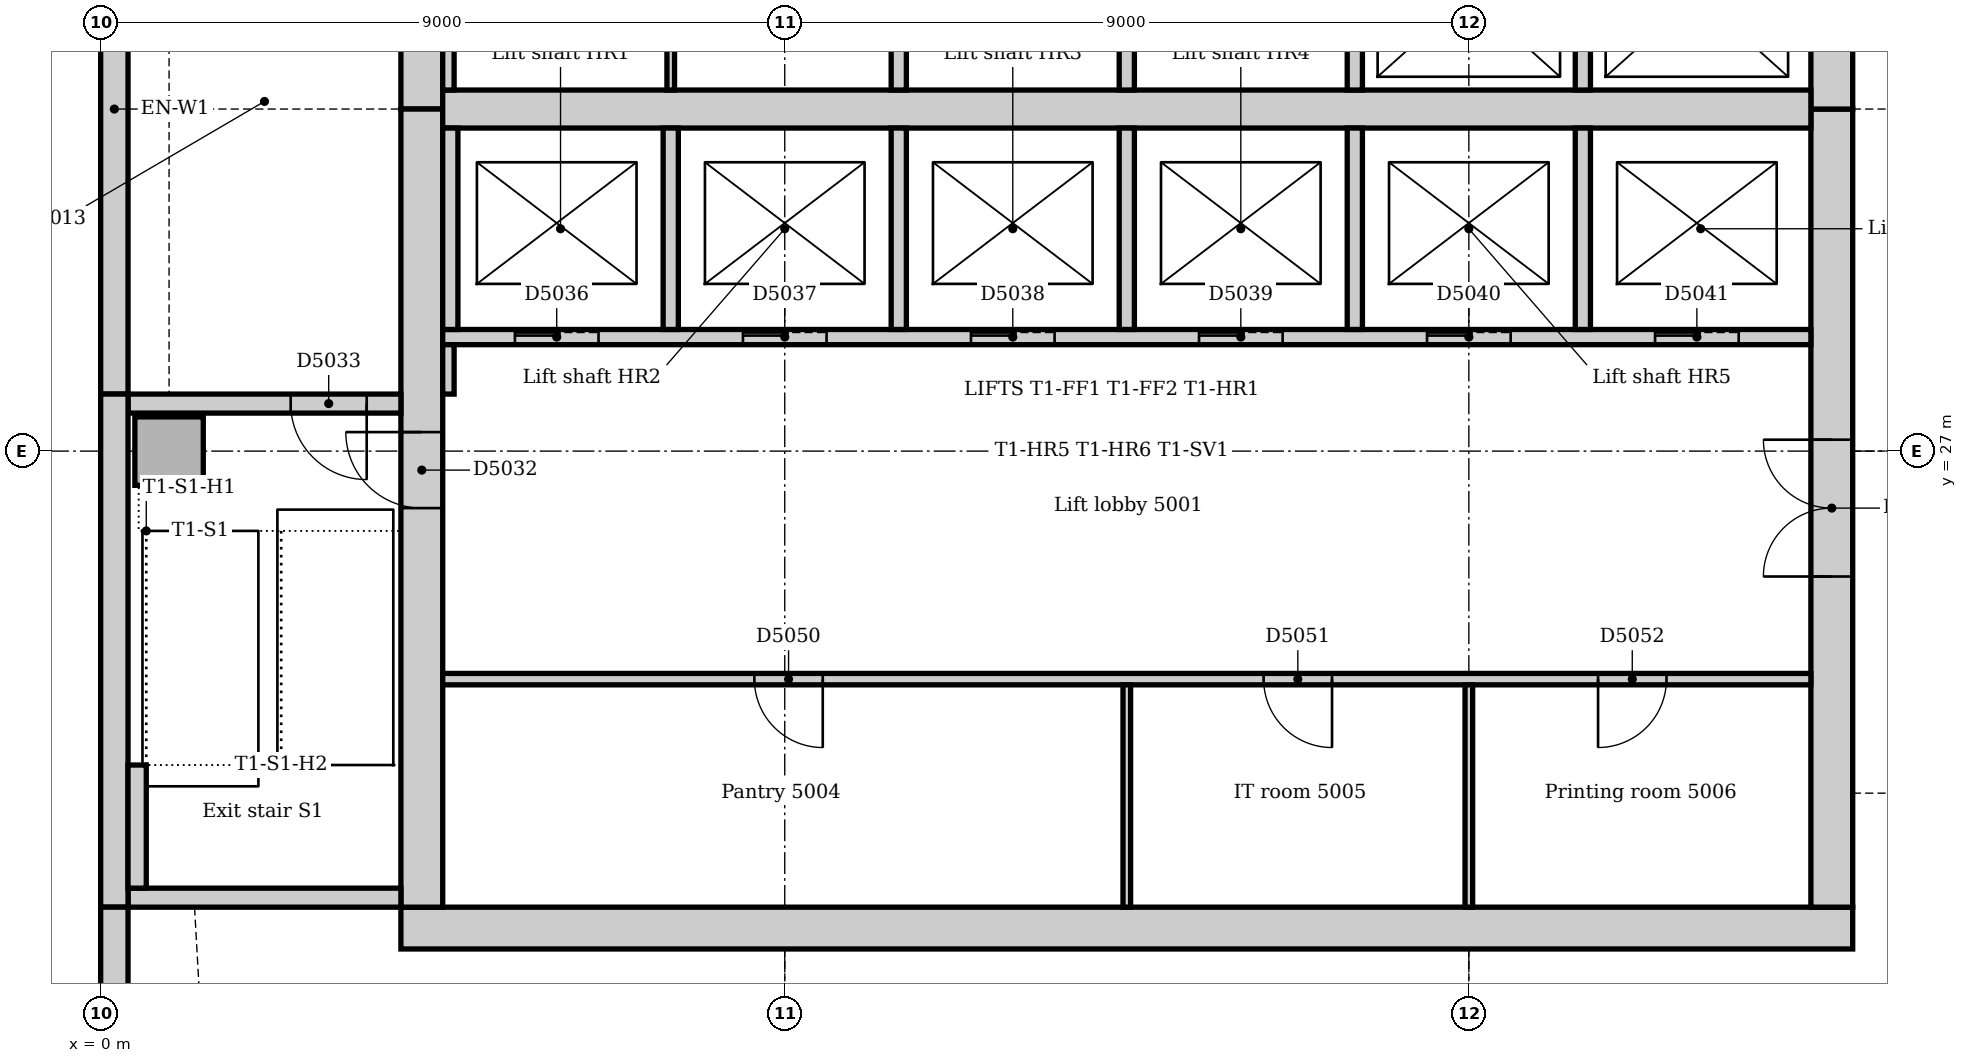
"""IFC4 building model, lengths in metres.
Left out: names, types, materials, properties, quantities, classifications, styles, units other than length and angle.
Written with IfcOpenShell. Run it as: python <this file> out.ifc"""

import sys

from ifc_helpers import new_model, si_unit, direction, frame, frame_2d, origin, origin_2d, place, context, subcontext, project, spatial, rectangle, extrude, element, fill, save


model = new_model("IFC4")
c1 = context("Model", 3, precision=1e-05, world=origin(), true_north=direction((0.0, 1.0)))
c2 = subcontext(c1, "Body", "Model", "MODEL_VIEW")
j1 = project(units=[si_unit("LENGTHUNIT", "METRE"), si_unit("PLANEANGLEUNIT", "RADIAN")], contexts=[c1])
p1 = place(None, origin())
s1 = spatial("IfcSite", under=j1, at=p1, CompositionType="ELEMENT")
p2 = place(p1, origin())
s2 = spatial("IfcBuilding", under=s1, at=p2, CompositionType="ELEMENT")
p3 = place(p2, frame((0.0, 0.0, 210.0)))
s3 = spatial("IfcBuildingStorey", under=s2, at=p3, CompositionType="ELEMENT", Elevation=210.0)
p4 = place(p3, frame((3.95, 20.725, 0.0), z_axis=(0.0, 0.0, 1.0), x_axis=(1.0, 0.0, 0.0)))
e1 = element("IfcWall", 1, at=p4, inside=s3, PredefinedType="SOLIDWALL", context=c2, shape_type="SweptSolid", body=[
    extrude(rectangle(XDim=19.1, YDim=0.55, at=frame_2d((9.55, 0.0))), origin(), (0.0, 0.0, 1.0), 4.0),
])
p5 = place(p3, frame((22.775, 21.0, 0.0), z_axis=(0.0, 0.0, 1.0), x_axis=(0.0, 1.0, 0.0)))
e2 = element("IfcWall", 2, at=p5, inside=s3, PredefinedType="SOLIDWALL", context=c2, shape_type="SweptSolid", body=[
    extrude(rectangle(XDim=10.5, YDim=0.55, at=frame_2d((5.25, 0.0))), origin(), (0.0, 0.0, 1.0), 4.0),
])
p6 = place(p5, frame((4.35, 0.0, 0.0)))
e3 = element("IfcOpeningElement", 3, at=p6, cuts=e2, PredefinedType="OPENING", context=c2, shape_type="SweptSolid", body=[
    extrude(rectangle(XDim=1.8, YDim=2.1, at=frame_2d((0.9, 1.05))), frame((0.0, 0.285, 0.0), z_axis=(0.0, -1.0, 0.0), x_axis=(1.0, 0.0, 0.0)), (0.0, 0.0, 1.0), 0.57),
])
p7 = place(p3, frame((22.775, 31.5, 0.0), z_axis=(0.0, 0.0, 1.0), x_axis=(0.0, 1.0, 0.0)))
e4 = element("IfcWall", 4, at=p7, inside=s3, PredefinedType="SOLIDWALL", context=c2, shape_type="SweptSolid", body=[
    extrude(rectangle(XDim=10.5, YDim=0.55, at=frame_2d((5.25, 0.0))), origin(), (0.0, 0.0, 1.0), 4.0),
])
p8 = place(p7, frame((3.15, 0.0, 0.0)))
e5 = element("IfcOpeningElement", 5, at=p8, cuts=e4, PredefinedType="OPENING", context=c2, shape_type="SweptSolid", body=[
    extrude(rectangle(XDim=1.0, YDim=2.1, at=frame_2d((0.5, 1.05))), frame((0.0, 0.285, 0.0), z_axis=(0.0, -1.0, 0.0), x_axis=(1.0, 0.0, 0.0)), (0.0, 0.0, 1.0), 0.57),
])
p9 = place(p7, frame((5.2, 0.0, 0.0)))
e6 = element("IfcOpeningElement", 6, at=p9, cuts=e4, PredefinedType="OPENING", context=c2, shape_type="SweptSolid", body=[
    extrude(rectangle(XDim=1.0, YDim=2.1, at=frame_2d((0.5, 1.05))), frame((0.0, 0.285, 0.0), z_axis=(0.0, -1.0, 0.0), x_axis=(1.0, 0.0, 0.0)), (0.0, 0.0, 1.0), 0.57),
])
p10 = place(p3, frame((4.225, 42.0, 0.0), z_axis=(0.0, 0.0, 1.0), x_axis=(0.0, -1.0, 0.0)))
e7 = element("IfcWall", 7, at=p10, inside=s3, PredefinedType="SOLIDWALL", context=c2, shape_type="SweptSolid", body=[
    extrude(rectangle(XDim=10.5, YDim=0.55, at=frame_2d((5.25, 0.0))), origin(), (0.0, 0.0, 1.0), 4.0),
])
p11 = place(p10, frame((5.3, 0.0, 0.0)))
e8 = element("IfcOpeningElement", 8, at=p11, cuts=e7, PredefinedType="OPENING", context=c2, shape_type="SweptSolid", body=[
    extrude(rectangle(XDim=1.0, YDim=2.1, at=frame_2d((0.5, 1.05))), frame((0.0, 0.285, 0.0), z_axis=(0.0, -1.0, 0.0), x_axis=(1.0, 0.0, 0.0)), (0.0, 0.0, 1.0), 0.57),
])
p12 = place(p3, frame((4.225, 31.5, 0.0), z_axis=(0.0, 0.0, 1.0), x_axis=(0.0, -1.0, 0.0)))
e9 = element("IfcWall", 9, at=p12, inside=s3, PredefinedType="SOLIDWALL", context=c2, shape_type="SweptSolid", body=[
    extrude(rectangle(XDim=10.5, YDim=0.55, at=frame_2d((5.25, 0.0))), origin(), (0.0, 0.0, 1.0), 4.0),
])
p13 = place(p12, frame((4.25, 0.0, 0.0)))
e10 = element("IfcOpeningElement", 10, at=p13, cuts=e9, PredefinedType="OPENING", context=c2, shape_type="SweptSolid", body=[
    extrude(rectangle(XDim=1.0, YDim=2.1, at=frame_2d((0.5, 1.05))), frame((0.0, 0.285, 0.0), z_axis=(0.0, -1.0, 0.0), x_axis=(1.0, 0.0, 0.0)), (0.0, 0.0, 1.0), 0.57),
])
p14 = place(p3, frame((4.5, 31.5, 0.0), z_axis=(0.0, 0.0, 1.0), x_axis=(1.0, 0.0, 0.0)))
e11 = element("IfcWall", 11, at=p14, inside=s3, PredefinedType="SOLIDWALL", context=c2, shape_type="SweptSolid", body=[
    extrude(rectangle(XDim=18.0, YDim=0.5, at=frame_2d((9.0, 0.0))), origin(), (0.0, 0.0, 1.0), 4.0),
])
p15 = place(p3, frame((0.36, 21.125, 0.0), z_axis=(0.0, 0.0, 1.0), x_axis=(1.0, 0.0, 0.0)))
e12 = element("IfcWall", 12, at=p15, inside=s3, PredefinedType="SOLIDWALL", context=c2, shape_type="SweptSolid", body=[
    extrude(rectangle(XDim=3.59, YDim=0.25, at=frame_2d((1.795, 0.0))), origin(), (0.0, 0.0, 1.0), 4.0),
])
p16 = place(p3, frame((3.95, 27.625, 0.0), z_axis=(0.0, 0.0, 1.0), x_axis=(-1.0, 0.0, 0.0)))
e13 = element("IfcWall", 13, at=p16, inside=s3, PredefinedType="SOLIDWALL", context=c2, shape_type="SweptSolid", body=[
    extrude(rectangle(XDim=3.59, YDim=0.25, at=frame_2d((1.795, 0.0))), origin(), (0.0, 0.0, 1.0), 4.0),
])
p17 = place(p16, frame((0.45, 0.0, 0.0)))
e14 = element("IfcOpeningElement", 14, at=p17, cuts=e13, PredefinedType="OPENING", context=c2, shape_type="SweptSolid", body=[
    extrude(rectangle(XDim=1.0, YDim=2.1, at=frame_2d((0.5, 1.05))), frame((0.0, 0.135, 0.0), z_axis=(0.0, -1.0, 0.0), x_axis=(1.0, 0.0, 0.0)), (0.0, 0.0, 1.0), 0.27),
])
p18 = place(p3, frame((0.9, 27.0, 0.0), z_axis=(0.0, 0.0, 1.0), x_axis=(1.0, 0.0, 0.0)))
e15 = element("IfcColumn", 15, at=p18, inside=s3, PredefinedType="COLUMN", context=c2, shape_type="SweptSolid", body=[
    extrude(rectangle(XDim=0.9, YDim=0.9, at=origin_2d()), origin(), (0.0, 0.0, 1.0), 4.0),
])
p19 = place(p3, frame((0.18, 35.25, 0.0), z_axis=(0.0, 0.0, 1.0), x_axis=(0.0, -1.0, 0.0)))
e16 = element("IfcWall", 16, at=p19, inside=s3, PredefinedType="STANDARD", context=c2, shape_type="SweptSolid", body=[
    extrude(rectangle(XDim=7.5, YDim=0.36, at=frame_2d((3.75, 0.0))), origin(), (0.0, 0.0, 1.0), 3.85),
])
p20 = place(p3, frame((0.18, 27.75, 0.0), z_axis=(0.0, 0.0, 1.0), x_axis=(0.0, -1.0, 0.0)))
e17 = element("IfcWall", 17, at=p20, inside=s3, PredefinedType="STANDARD", context=c2, shape_type="SweptSolid", body=[
    extrude(rectangle(XDim=6.75, YDim=0.36, at=frame_2d((3.375, 0.0))), origin(), (0.0, 0.0, 1.0), 3.85),
])
p21 = place(p3, frame((0.18, 21.0, 0.0), z_axis=(0.0, 0.0, 1.0), x_axis=(0.0, -1.0, 0.0)))
e18 = element("IfcWall", 18, at=p21, inside=s3, PredefinedType="STANDARD", context=c2, shape_type="SweptSolid", body=[
    extrude(rectangle(XDim=3.257, YDim=0.36, at=frame_2d((1.629, 0.0))), origin(), (0.0, 0.0, 1.0), 3.85),
])
p22 = place(p3, frame((0.48, 21.25, 0.0), z_axis=(0.0, 0.0, 1.0), x_axis=(0.0, 1.0, 0.0)))
e19 = element("IfcWall", 19, at=p22, inside=s3, PredefinedType="STANDARD", context=c2, shape_type="SweptSolid", body=[
    extrude(rectangle(XDim=1.62, YDim=0.24, at=frame_2d((0.81, 0.0))), origin(), (0.0, 0.0, 1.0), 4.0),
])
p23 = place(p3, frame((4.5, 28.5, 0.0), z_axis=(0.0, 0.0, 1.0), x_axis=(1.0, 0.0, 0.0)))
e20 = element("IfcWall", 20, at=p23, inside=s3, PredefinedType="PARTITIONING", context=c2, shape_type="SweptSolid", body=[
    extrude(rectangle(XDim=18.0, YDim=0.2, at=frame_2d((9.0, 0.0))), origin(), (0.0, 0.0, 1.0), 3.85),
])
p24 = place(p23, frame((0.95, 0.0, 0.0)))
e21 = element("IfcOpeningElement", 21, at=p24, cuts=e20, PredefinedType="OPENING", context=c2, shape_type="SweptSolid", body=[
    extrude(rectangle(XDim=1.1, YDim=2.1, at=frame_2d((0.55, 1.05))), frame((0.0, 0.11, 0.0), z_axis=(0.0, -1.0, 0.0), x_axis=(1.0, 0.0, 0.0)), (0.0, 0.0, 1.0), 0.22),
])
p25 = place(p23, frame((3.95, 0.0, 0.0)))
e22 = element("IfcOpeningElement", 22, at=p25, cuts=e20, PredefinedType="OPENING", context=c2, shape_type="SweptSolid", body=[
    extrude(rectangle(XDim=1.1, YDim=2.1, at=frame_2d((0.55, 1.05))), frame((0.0, 0.11, 0.0), z_axis=(0.0, -1.0, 0.0), x_axis=(1.0, 0.0, 0.0)), (0.0, 0.0, 1.0), 0.22),
])
p26 = place(p23, frame((6.95, 0.0, 0.0)))
e23 = element("IfcOpeningElement", 23, at=p26, cuts=e20, PredefinedType="OPENING", context=c2, shape_type="SweptSolid", body=[
    extrude(rectangle(XDim=1.1, YDim=2.1, at=frame_2d((0.55, 1.05))), frame((0.0, 0.11, 0.0), z_axis=(0.0, -1.0, 0.0), x_axis=(1.0, 0.0, 0.0)), (0.0, 0.0, 1.0), 0.22),
])
p27 = place(p23, frame((9.95, 0.0, 0.0)))
e24 = element("IfcOpeningElement", 24, at=p27, cuts=e20, PredefinedType="OPENING", context=c2, shape_type="SweptSolid", body=[
    extrude(rectangle(XDim=1.1, YDim=2.1, at=frame_2d((0.55, 1.05))), frame((0.0, 0.11, 0.0), z_axis=(0.0, -1.0, 0.0), x_axis=(1.0, 0.0, 0.0)), (0.0, 0.0, 1.0), 0.22),
])
p28 = place(p23, frame((12.95, 0.0, 0.0)))
e25 = element("IfcOpeningElement", 25, at=p28, cuts=e20, PredefinedType="OPENING", context=c2, shape_type="SweptSolid", body=[
    extrude(rectangle(XDim=1.1, YDim=2.1, at=frame_2d((0.55, 1.05))), frame((0.0, 0.11, 0.0), z_axis=(0.0, -1.0, 0.0), x_axis=(1.0, 0.0, 0.0)), (0.0, 0.0, 1.0), 0.22),
])
p29 = place(p23, frame((15.95, 0.0, 0.0)))
e26 = element("IfcOpeningElement", 26, at=p29, cuts=e20, PredefinedType="OPENING", context=c2, shape_type="SweptSolid", body=[
    extrude(rectangle(XDim=1.1, YDim=2.1, at=frame_2d((0.55, 1.05))), frame((0.0, 0.11, 0.0), z_axis=(0.0, -1.0, 0.0), x_axis=(1.0, 0.0, 0.0)), (0.0, 0.0, 1.0), 0.22),
])
for number, where, z_axis, x_axis in (
    (27, (10.5, 28.6, 0.0), (0.0, 0.0, 1.0), (0.0, 1.0, 0.0)),
    (28, (10.5, 31.75, 0.0), (0.0, 0.0, 1.0), (0.0, 1.0, 0.0)),
    (29, (13.5, 28.6, 0.0), (0.0, 0.0, 1.0), (0.0, 1.0, 0.0)),
    (30, (13.5, 31.75, 0.0), (0.0, 0.0, 1.0), (0.0, 1.0, 0.0)),
    (31, (16.5, 28.6, 0.0), (0.0, 0.0, 1.0), (0.0, 1.0, 0.0)),
    (32, (16.5, 31.75, 0.0), (0.0, 0.0, 1.0), (0.0, 1.0, 0.0)),
    (33, (19.5, 28.6, 0.0), (0.0, 0.0, 1.0), (0.0, 1.0, 0.0)),
    (34, (19.5, 31.75, 0.0), (0.0, 0.0, 1.0), (0.0, 1.0, 0.0)),
    (35, (4.6, 28.6, 0.0), (0.0, 0.0, 1.0), (0.0, 1.0, 0.0)),
    (36, (7.5, 28.6, 0.0), (0.0, 0.0, 1.0), (0.0, 1.0, 0.0)),
):
    element("IfcWall", number, at=place(p3, frame(where, z_axis=z_axis, x_axis=x_axis)), inside=s3, PredefinedType="PARTITIONING", context=c2, shape_type="SweptSolid", body=[
        extrude(rectangle(XDim=2.65, YDim=0.2, at=frame_2d((1.325, 0.0))), origin(), (0.0, 0.0, 1.0), 3.85),
    ])
p30 = place(p3, frame((4.5, 24.0, 0.0), z_axis=(0.0, 0.0, 1.0), x_axis=(1.0, 0.0, 0.0)))
e37 = element("IfcWall", 37, at=p30, inside=s3, PredefinedType="PARTITIONING", context=c2, shape_type="SweptSolid", body=[
    extrude(rectangle(XDim=18.0, YDim=0.15, at=frame_2d((9.0, 0.0))), origin(), (0.0, 0.0, 1.0), 3.85),
])
p31 = place(p30, frame((4.1, 0.0, 0.0)))
e38 = element("IfcOpeningElement", 38, at=p31, cuts=e37, PredefinedType="OPENING", context=c2, shape_type="SweptSolid", body=[
    extrude(rectangle(XDim=0.9, YDim=2.1, at=frame_2d((0.45, 1.05))), frame((0.0, 0.085, 0.0), z_axis=(0.0, -1.0, 0.0), x_axis=(1.0, 0.0, 0.0)), (0.0, 0.0, 1.0), 0.17),
])
p32 = place(p30, frame((10.8, 0.0, 0.0)))
e39 = element("IfcOpeningElement", 39, at=p32, cuts=e37, PredefinedType="OPENING", context=c2, shape_type="SweptSolid", body=[
    extrude(rectangle(XDim=0.9, YDim=2.1, at=frame_2d((0.45, 1.05))), frame((0.0, 0.085, 0.0), z_axis=(0.0, -1.0, 0.0), x_axis=(1.0, 0.0, 0.0)), (0.0, 0.0, 1.0), 0.17),
])
p33 = place(p30, frame((15.2, 0.0, 0.0)))
e40 = element("IfcOpeningElement", 40, at=p33, cuts=e37, PredefinedType="OPENING", context=c2, shape_type="SweptSolid", body=[
    extrude(rectangle(XDim=0.9, YDim=2.1, at=frame_2d((0.45, 1.05))), frame((0.0, 0.085, 0.0), z_axis=(0.0, -1.0, 0.0), x_axis=(1.0, 0.0, 0.0)), (0.0, 0.0, 1.0), 0.17),
])
p34 = place(p3, frame((4.575, 31.75, 0.0), z_axis=(0.0, 0.0, 1.0), x_axis=(0.0, 1.0, 0.0)))
e41 = element("IfcWall", 41, at=p34, inside=s3, PredefinedType="PARTITIONING", context=c2, shape_type="SweptSolid", body=[
    extrude(rectangle(XDim=2.675, YDim=0.15, at=frame_2d((1.337, 0.0))), origin(), (0.0, 0.0, 1.0), 3.85),
])
p35 = place(p3, frame((4.575, 27.75, 0.0), z_axis=(0.0, 0.0, 1.0), x_axis=(0.0, 1.0, 0.0)))
e42 = element("IfcWall", 42, at=p35, inside=s3, PredefinedType="PARTITIONING", context=c2, shape_type="SweptSolid", body=[
    extrude(rectangle(XDim=0.65, YDim=0.15, at=frame_2d((0.325, 0.0))), origin(), (0.0, 0.0, 1.0), 3.85),
])
p36 = place(p3, frame((7.5, 31.75, 0.0), z_axis=(0.0, 0.0, 1.0), x_axis=(0.0, 1.0, 0.0)))
e43 = element("IfcWall", 43, at=p36, inside=s3, PredefinedType="PARTITIONING", context=c2, shape_type="SweptSolid", body=[
    extrude(rectangle(XDim=2.675, YDim=0.1, at=frame_2d((1.337, 0.0))), origin(), (0.0, 0.0, 1.0), 3.85),
])
for number, where, z_axis, x_axis in (
    (44, (13.5, 21.0, 0.0), (0.0, 0.0, 1.0), (0.0, 1.0, 0.0)),
    (45, (18.0, 21.0, 0.0), (0.0, 0.0, 1.0), (0.0, 1.0, 0.0)),
):
    element("IfcWall", number, at=place(p3, frame(where, z_axis=z_axis, x_axis=x_axis)), inside=s3, PredefinedType="PARTITIONING", context=c2, shape_type="SweptSolid", body=[
        extrude(rectangle(XDim=2.925, YDim=0.1, at=frame_2d((1.462, 0.0))), origin(), (0.0, 0.0, 1.0), 3.85),
    ])
p37 = place(p13, frame((1.0, 0.0, 0.0), z_axis=(0.0, 0.0, 1.0), x_axis=(-1.0, 0.0, 0.0)))
e46 = element("IfcDoor", 46, at=p37, inside=s3, OperationType="SINGLE_SWING_RIGHT", PredefinedType="DOOR", context=c2, shape_type="SweptSolid", body=[
    extrude(rectangle(XDim=1.0, YDim=2.1, at=frame_2d((0.5, 1.05))), frame((0.0, 0.025, 0.0), z_axis=(0.0, -1.0, 0.0), x_axis=(1.0, 0.0, 0.0)), (0.0, 0.0, 1.0), 0.05),
])
fill(e10, e46)
p38 = place(p17, origin())
e47 = element("IfcDoor", 47, at=p38, inside=s3, OperationType="SINGLE_SWING_LEFT", PredefinedType="DOOR", context=c2, shape_type="SweptSolid", body=[
    extrude(rectangle(XDim=1.0, YDim=2.1, at=frame_2d((0.5, 1.05))), frame((0.0, 0.025, 0.0), z_axis=(0.0, -1.0, 0.0), x_axis=(1.0, 0.0, 0.0)), (0.0, 0.0, 1.0), 0.05),
])
fill(e14, e47)
p39 = place(p24, origin())
e48 = element("IfcDoor", 48, at=p39, inside=s3, OperationType="SLIDING_TO_LEFT", PredefinedType="DOOR", context=c2, shape_type="SweptSolid", body=[
    extrude(rectangle(XDim=1.1, YDim=2.1, at=frame_2d((0.55, 1.05))), frame((0.0, 0.025, 0.0), z_axis=(0.0, -1.0, 0.0), x_axis=(1.0, 0.0, 0.0)), (0.0, 0.0, 1.0), 0.05),
])
fill(e21, e48)
p40 = place(p25, origin())
e49 = element("IfcDoor", 49, at=p40, inside=s3, OperationType="SLIDING_TO_LEFT", PredefinedType="DOOR", context=c2, shape_type="SweptSolid", body=[
    extrude(rectangle(XDim=1.1, YDim=2.1, at=frame_2d((0.55, 1.05))), frame((0.0, 0.025, 0.0), z_axis=(0.0, -1.0, 0.0), x_axis=(1.0, 0.0, 0.0)), (0.0, 0.0, 1.0), 0.05),
])
fill(e22, e49)
p41 = place(p26, origin())
e50 = element("IfcDoor", 50, at=p41, inside=s3, OperationType="SLIDING_TO_LEFT", PredefinedType="DOOR", context=c2, shape_type="SweptSolid", body=[
    extrude(rectangle(XDim=1.1, YDim=2.1, at=frame_2d((0.55, 1.05))), frame((0.0, 0.025, 0.0), z_axis=(0.0, -1.0, 0.0), x_axis=(1.0, 0.0, 0.0)), (0.0, 0.0, 1.0), 0.05),
])
fill(e23, e50)
p42 = place(p27, origin())
e51 = element("IfcDoor", 51, at=p42, inside=s3, OperationType="SLIDING_TO_LEFT", PredefinedType="DOOR", context=c2, shape_type="SweptSolid", body=[
    extrude(rectangle(XDim=1.1, YDim=2.1, at=frame_2d((0.55, 1.05))), frame((0.0, 0.025, 0.0), z_axis=(0.0, -1.0, 0.0), x_axis=(1.0, 0.0, 0.0)), (0.0, 0.0, 1.0), 0.05),
])
fill(e24, e51)
p43 = place(p28, origin())
e52 = element("IfcDoor", 52, at=p43, inside=s3, OperationType="SLIDING_TO_LEFT", PredefinedType="DOOR", context=c2, shape_type="SweptSolid", body=[
    extrude(rectangle(XDim=1.1, YDim=2.1, at=frame_2d((0.55, 1.05))), frame((0.0, 0.025, 0.0), z_axis=(0.0, -1.0, 0.0), x_axis=(1.0, 0.0, 0.0)), (0.0, 0.0, 1.0), 0.05),
])
fill(e25, e52)
p44 = place(p29, origin())
e53 = element("IfcDoor", 53, at=p44, inside=s3, OperationType="SLIDING_TO_LEFT", PredefinedType="DOOR", context=c2, shape_type="SweptSolid", body=[
    extrude(rectangle(XDim=1.1, YDim=2.1, at=frame_2d((0.55, 1.05))), frame((0.0, 0.025, 0.0), z_axis=(0.0, -1.0, 0.0), x_axis=(1.0, 0.0, 0.0)), (0.0, 0.0, 1.0), 0.05),
])
fill(e26, e53)
p45 = place(p6, origin())
e54 = element("IfcDoor", 54, at=p45, inside=s3, OperationType="DOUBLE_DOOR_DOUBLE_SWING", PredefinedType="DOOR", context=c2, shape_type="SweptSolid", body=[
    extrude(rectangle(XDim=1.8, YDim=2.1, at=frame_2d((0.9, 1.05))), frame((0.0, 0.025, 0.0), z_axis=(0.0, -1.0, 0.0), x_axis=(1.0, 0.0, 0.0)), (0.0, 0.0, 1.0), 0.05),
])
fill(e3, e54)
p46 = place(p31, frame((0.9, 0.0, 0.0), z_axis=(0.0, 0.0, 1.0), x_axis=(-1.0, 0.0, 0.0)))
e55 = element("IfcDoor", 55, at=p46, inside=s3, OperationType="SINGLE_SWING_LEFT", PredefinedType="DOOR", context=c2, shape_type="SweptSolid", body=[
    extrude(rectangle(XDim=0.9, YDim=2.1, at=frame_2d((0.45, 1.05))), frame((0.0, 0.025, 0.0), z_axis=(0.0, -1.0, 0.0), x_axis=(1.0, 0.0, 0.0)), (0.0, 0.0, 1.0), 0.05),
])
fill(e38, e55)
p47 = place(p32, frame((0.9, 0.0, 0.0), z_axis=(0.0, 0.0, 1.0), x_axis=(-1.0, 0.0, 0.0)))
e56 = element("IfcDoor", 56, at=p47, inside=s3, OperationType="SINGLE_SWING_LEFT", PredefinedType="DOOR", context=c2, shape_type="SweptSolid", body=[
    extrude(rectangle(XDim=0.9, YDim=2.1, at=frame_2d((0.45, 1.05))), frame((0.0, 0.025, 0.0), z_axis=(0.0, -1.0, 0.0), x_axis=(1.0, 0.0, 0.0)), (0.0, 0.0, 1.0), 0.05),
])
fill(e39, e56)
p48 = place(p33, frame((0.9, 0.0, 0.0), z_axis=(0.0, 0.0, 1.0), x_axis=(-1.0, 0.0, 0.0)))
e57 = element("IfcDoor", 57, at=p48, inside=s3, OperationType="SINGLE_SWING_RIGHT", PredefinedType="DOOR", context=c2, shape_type="SweptSolid", body=[
    extrude(rectangle(XDim=0.9, YDim=2.1, at=frame_2d((0.45, 1.05))), frame((0.0, 0.025, 0.0), z_axis=(0.0, -1.0, 0.0), x_axis=(1.0, 0.0, 0.0)), (0.0, 0.0, 1.0), 0.05),
])
fill(e40, e57)
save(model, sys.argv[1])
